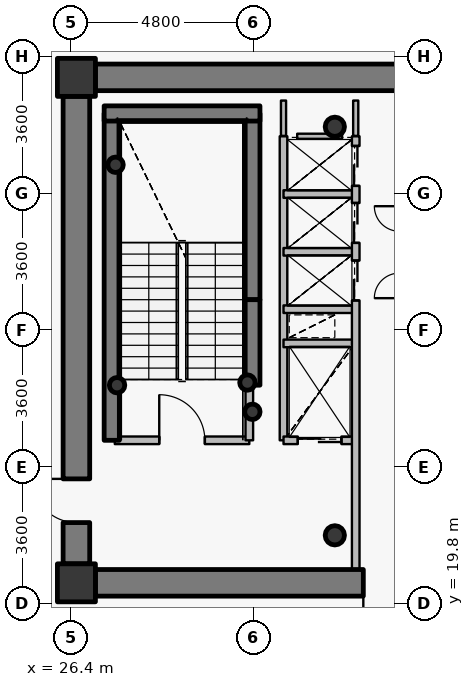
"""IFC4 building model, lengths in metres.
Left out: names, types, materials, properties, quantities, classifications, styles, units other than length and angle.
Written with IfcOpenShell. Run it as: python <this file> out.ifc"""

import sys

from ifc_helpers import new_model, si_unit, direction, frame, frame_2d, origin, origin_2d, place, context, subcontext, project, spatial, rectangle, hollow_circle, extrude, source, transform, mapped, element, fill, save


model = new_model("IFC4")
c1 = context("Model", 3, precision=1e-05, world=origin(), true_north=direction((0.0, 1.0)))
c2 = subcontext(c1, "Body", "Model", "MODEL_VIEW")
j1 = project(units=[si_unit("LENGTHUNIT", "METRE"), si_unit("PLANEANGLEUNIT", "RADIAN")], contexts=[c1])
p1 = place(None, origin())
s1 = spatial("IfcSite", under=j1, at=p1, CompositionType="ELEMENT")
p2 = place(p1, origin())
s2 = spatial("IfcBuilding", under=s1, at=p2, CompositionType="ELEMENT")
p3 = place(p2, frame((0.0, 0.0, 247.8)))
s3 = spatial("IfcBuildingStorey", under=s2, at=p3, CompositionType="ELEMENT", Elevation=247.8)
for number, where, z_axis, x_axis in (
    (1, (26.55, 20.35, 0.0), (0.0, 0.0, 1.0), (1.0, 0.0, 0.0)),
    (2, (26.55, 33.65, 0.0), (0.0, 0.0, 1.0), (1.0, 0.0, 0.0)),
):
    element("IfcColumn", number, at=place(p3, frame(where, z_axis=z_axis, x_axis=x_axis)), inside=s3, PredefinedType="COLUMN", context=c2, shape_type="SweptSolid", body=[
        extrude(rectangle(XDim=1.0, YDim=1.0, at=origin_2d()), origin(), (0.0, 0.0, 1.0), 3.75),
    ])
for number, where, z_axis, x_axis in (
    (3, (33.35, 21.6, 0.0), (0.0, 0.0, 1.0), (1.0, 0.0, 0.0)),
    (4, (33.35, 32.35, 0.0), (0.0, 0.0, 1.0), (1.0, 0.0, 0.0)),
):
    element("IfcColumn", number, at=place(p3, frame(where, z_axis=z_axis, x_axis=x_axis)), inside=s3, PredefinedType="COLUMN", context=c2, shape_type="SweptSolid", body=[
        extrude(hollow_circle(Radius=0.254, WallThickness=0.02, at=origin_2d()), origin(), (0.0, 0.0, 1.0), 3.75),
    ])
p4 = place(p3, frame((27.48, 24.1, 0.0), z_axis=(0.0, 0.0, 1.0), x_axis=(0.0, 1.0, 0.0)))
e5 = element("IfcWall", 5, at=p4, inside=s3, PredefinedType="SHEAR", context=c2, shape_type="SweptSolid", body=[
    extrude(rectangle(XDim=8.6, YDim=0.4, at=frame_2d((4.3, 0.0))), origin(), (0.0, 0.0, 1.0), 3.75),
])
p5 = place(p3, frame((31.18, 27.8, 0.0), z_axis=(0.0, 0.0, 1.0), x_axis=(0.0, 1.0, 0.0)))
e6 = element("IfcWall", 6, at=p5, inside=s3, PredefinedType="SHEAR", context=c2, shape_type="SweptSolid", body=[
    extrude(rectangle(XDim=4.9, YDim=0.4, at=frame_2d((2.45, 0.0))), origin(), (0.0, 0.0, 1.0), 3.75),
])
p6 = place(p3, frame((27.28, 32.7, 0.0), z_axis=(0.0, 0.0, 1.0), x_axis=(1.0, 0.0, 0.0)))
e7 = element("IfcWall", 7, at=p6, inside=s3, PredefinedType="SHEAR", context=c2, shape_type="SweptSolid", body=[
    extrude(rectangle(XDim=4.1, YDim=0.4, at=frame_2d((2.05, 0.0))), origin(), (0.0, 0.0, 1.0), 3.75),
])
for number, where, z_axis, x_axis in (
    (8, (27.58, 31.35, 0.0), (0.0, 0.0, 1.0), (1.0, 0.0, 0.0)),
    (9, (31.05, 25.62, 0.0), (0.0, 0.0, 1.0), (1.0, 0.0, 0.0)),
    (10, (31.18, 24.85, 0.0), (0.0, 0.0, 1.0), (1.0, 0.0, 0.0)),
    (11, (27.62, 25.55, 0.0), (0.0, 0.0, 1.0), (1.0, 0.0, 0.0)),
):
    element("IfcColumn", number, at=place(p3, frame(where, z_axis=z_axis, x_axis=x_axis)), inside=s3, PredefinedType="COLUMN", context=c2, shape_type="SweptSolid", body=[
        extrude(hollow_circle(Radius=0.203, WallThickness=0.016, at=origin_2d()), origin(), (0.0, 0.0, 1.0), 3.75),
    ])
p7 = place(p3, frame((27.05, 33.65, 0.0), z_axis=(0.0, 0.0, 1.0), x_axis=(1.0, 0.0, 0.0)))
e12 = element("IfcWall", 12, at=p7, inside=s3, PredefinedType="SHEAR", context=c2, shape_type="SweptSolid", body=[
    extrude(rectangle(XDim=17.9, YDim=0.7, at=frame_2d((8.95, 0.0))), origin(), (0.0, 0.0, 1.0), 3.05),
])
p8 = place(p7, frame((13.675, 0.0, 0.0)))
e13 = element("IfcOpeningElement", 13, at=p8, cuts=e12, PredefinedType="OPENING", context=c2, shape_type="SweptSolid", body=[
    extrude(rectangle(XDim=1.15, YDim=2.15, at=origin_2d()), frame((0.575, 0.36, 1.075), z_axis=(0.0, -1.0, 0.0), x_axis=(1.0, 0.0, 0.0)), (0.0, 0.0, 1.0), 0.72),
])
p9 = place(p3, frame((44.95, 20.35, 0.0), z_axis=(0.0, 0.0, 1.0), x_axis=(-1.0, 0.0, 0.0)))
e14 = element("IfcWall", 14, at=p9, inside=s3, PredefinedType="SHEAR", context=c2, shape_type="SweptSolid", body=[
    extrude(rectangle(XDim=17.9, YDim=0.7, at=frame_2d((8.95, 0.0))), origin(), (0.0, 0.0, 1.0), 3.05),
])
p10 = place(p9, frame((9.7, 0.0, 0.0)))
e15 = element("IfcOpeningElement", 15, at=p10, cuts=e14, PredefinedType="OPENING", context=c2, shape_type="SweptSolid", body=[
    extrude(rectangle(XDim=1.15, YDim=2.15, at=origin_2d()), frame((0.575, 0.36, 1.075), z_axis=(0.0, -1.0, 0.0), x_axis=(1.0, 0.0, 0.0)), (0.0, 0.0, 1.0), 0.72),
])
p11 = place(p3, frame((26.55, 20.85, 0.0), z_axis=(0.0, 0.0, 1.0), x_axis=(0.0, 1.0, 0.0)))
e16 = element("IfcWall", 16, at=p11, inside=s3, PredefinedType="SHEAR", context=c2, shape_type="SweptSolid", body=[
    extrude(rectangle(XDim=12.3, YDim=0.7, at=frame_2d((6.15, 0.0))), origin(), (0.0, 0.0, 1.0), 3.05),
])
p12 = place(p11, frame((1.085, 0.0, 0.0)))
e17 = element("IfcOpeningElement", 17, at=p12, cuts=e16, PredefinedType="OPENING", context=c2, shape_type="SweptSolid", body=[
    extrude(rectangle(XDim=1.15, YDim=2.15, at=origin_2d()), frame((0.575, 0.36, 1.075), z_axis=(0.0, -1.0, 0.0), x_axis=(1.0, 0.0, 0.0)), (0.0, 0.0, 1.0), 0.72),
])
p13 = place(p3, frame((31.18, 25.55, 0.0), z_axis=(0.0, 0.0, 1.0), x_axis=(0.0, 1.0, 0.0)))
e18 = element("IfcWall", 18, at=p13, inside=s3, PredefinedType="SHEAR", context=c2, shape_type="SweptSolid", body=[
    extrude(rectangle(XDim=2.25, YDim=0.4, at=frame_2d((1.125, 0.0))), origin(), (0.0, 0.0, 1.0), 3.1),
])
p14 = place(p3, frame((27.56, 24.1, 0.0), z_axis=(0.0, 0.0, 1.0), x_axis=(1.0, 0.0, 0.0)))
e19 = element("IfcWall", 19, at=p14, inside=s3, PredefinedType="PARTITIONING", context=c2, shape_type="SweptSolid", body=[
    extrude(rectangle(XDim=3.54, YDim=0.2, at=frame_2d((1.77, 0.0))), origin(), (0.0, 0.0, 1.0), 3.5),
])
p15 = place(p14, frame((1.17, 0.0, 0.0)))
e20 = element("IfcOpeningElement", 20, at=p15, cuts=e19, PredefinedType="OPENING", context=c2, shape_type="SweptSolid", body=[
    extrude(rectangle(XDim=1.2, YDim=2.15, at=origin_2d()), frame((0.6, 0.11, 1.075), z_axis=(0.0, -1.0, 0.0), x_axis=(1.0, 0.0, 0.0)), (0.0, 0.0, 1.0), 0.22),
])
p16 = place(p3, frame((31.1, 24.1, 0.0), z_axis=(0.0, 0.0, 1.0), x_axis=(0.0, 1.0, 0.0)))
e21 = element("IfcWall", 21, at=p16, inside=s3, PredefinedType="PARTITIONING", context=c2, shape_type="SweptSolid", body=[
    extrude(rectangle(XDim=1.44, YDim=0.2, at=frame_2d((0.72, 0.0))), origin(), (0.0, 0.0, 1.0), 3.5),
])
p17 = place(p3, frame((32.0, 24.1, 0.0), z_axis=(0.0, 0.0, 1.0), x_axis=(0.0, 1.0, 0.0)))
e22 = element("IfcWall", 22, at=p17, inside=s3, PredefinedType="PARTITIONING", context=c2, shape_type="SweptSolid", body=[
    extrude(rectangle(XDim=8.0, YDim=0.2, at=frame_2d((4.0, 0.0))), origin(), (0.0, 0.0, 1.0), 3.5),
])
p18 = place(p3, frame((32.0, 24.1, 0.0), z_axis=(0.0, 0.0, 1.0), x_axis=(1.0, 0.0, 0.0)))
e23 = element("IfcWall", 23, at=p18, inside=s3, PredefinedType="PARTITIONING", context=c2, shape_type="SweptSolid", body=[
    extrude(rectangle(XDim=1.9, YDim=0.2, at=frame_2d((0.95, 0.0))), origin(), (0.0, 0.0, 1.0), 3.085),
])
p19 = place(p18, frame((0.375, 0.0, 0.0)))
e24 = element("IfcOpeningElement", 24, at=p19, cuts=e23, PredefinedType="OPENING", context=c2, shape_type="SweptSolid", body=[
    extrude(rectangle(XDim=1.15, YDim=2.15, at=origin_2d()), frame((0.575, 0.11, 1.075), z_axis=(0.0, -1.0, 0.0), x_axis=(1.0, 0.0, 0.0)), (0.0, 0.0, 1.0), 0.22),
])
for number, where, z_axis, x_axis in (
    (25, (32.0, 26.65, 0.0), (0.0, 0.0, 1.0), (1.0, 0.0, 0.0)),
    (26, (32.0, 27.55, 0.0), (0.0, 0.0, 1.0), (1.0, 0.0, 0.0)),
    (27, (32.0, 29.06, 0.0), (0.0, 0.0, 1.0), (1.0, 0.0, 0.0)),
    (28, (32.0, 30.58, 0.0), (0.0, 0.0, 1.0), (1.0, 0.0, 0.0)),
):
    element("IfcWall", number, at=place(p3, frame(where, z_axis=z_axis, x_axis=x_axis)), inside=s3, PredefinedType="PARTITIONING", context=c2, shape_type="SweptSolid", body=[
        extrude(rectangle(XDim=1.9, YDim=0.2, at=frame_2d((0.95, 0.0))), origin(), (0.0, 0.0, 1.0), 3.085),
    ])
p20 = place(p3, frame((33.9, 20.7, 0.0), z_axis=(0.0, 0.0, 1.0), x_axis=(0.0, 1.0, 0.0)))
e29 = element("IfcWall", 29, at=p20, inside=s3, PredefinedType="PARTITIONING", context=c2, shape_type="SweptSolid", body=[
    extrude(rectangle(XDim=11.4, YDim=0.2, at=frame_2d((5.7, 0.0))), origin(), (0.0, 0.0, 1.0), 3.085),
])
p21 = place(p20, frame((7.08, 0.0, 0.0)))
e30 = element("IfcOpeningElement", 30, at=p21, cuts=e29, PredefinedType="OPENING", context=c2, shape_type="SweptSolid", body=[
    extrude(rectangle(XDim=1.05, YDim=2.15, at=origin_2d()), frame((0.525, 0.11, 1.075), z_axis=(0.0, -1.0, 0.0), x_axis=(1.0, 0.0, 0.0)), (0.0, 0.0, 1.0), 0.22),
])
p22 = place(p20, frame((8.595, 0.0, 0.0)))
e31 = element("IfcOpeningElement", 31, at=p22, cuts=e29, PredefinedType="OPENING", context=c2, shape_type="SweptSolid", body=[
    extrude(rectangle(XDim=1.05, YDim=2.15, at=origin_2d()), frame((0.525, 0.11, 1.075), z_axis=(0.0, -1.0, 0.0), x_axis=(1.0, 0.0, 0.0)), (0.0, 0.0, 1.0), 0.22),
])
p23 = place(p20, frame((10.095, 0.0, 0.0)))
e32 = element("IfcOpeningElement", 32, at=p23, cuts=e29, PredefinedType="OPENING", context=c2, shape_type="SweptSolid", body=[
    extrude(rectangle(XDim=1.05, YDim=2.15, at=origin_2d()), frame((0.525, 0.11, 1.075), z_axis=(0.0, -1.0, 0.0), x_axis=(1.0, 0.0, 0.0)), (0.0, 0.0, 1.0), 0.22),
])
p24 = place(p3, frame((32.36, 32.1, 0.0), z_axis=(0.0, 0.0, 1.0), x_axis=(1.0, 0.0, 0.0)))
e33 = element("IfcWall", 33, at=p24, inside=s3, PredefinedType="PARTITIONING", context=c2, shape_type="SweptSolid", body=[
    extrude(rectangle(XDim=1.18, YDim=0.135, at=frame_2d((0.59, 0.0))), origin(), (0.0, 0.0, 1.0), 3.085),
])
p25 = place(p3, frame((32.0, 33.04, 0.0), z_axis=(0.0, 0.0, 1.0), x_axis=(0.0, -1.0, 0.0)))
e34 = element("IfcWall", 34, at=p25, inside=s3, PredefinedType="PARTITIONING", context=c2, shape_type="SweptSolid", body=[
    extrude(rectangle(XDim=0.93, YDim=0.135, at=frame_2d((0.465, 0.0))), origin(), (0.0, 0.0, 1.0), 3.035),
])
p26 = place(p3, frame((33.9, 32.11, 0.0), z_axis=(0.0, 0.0, 1.0), x_axis=(0.0, 1.0, 0.0)))
e35 = element("IfcWall", 35, at=p26, inside=s3, PredefinedType="PARTITIONING", context=c2, shape_type="SweptSolid", body=[
    extrude(rectangle(XDim=0.93, YDim=0.135, at=frame_2d((0.465, 0.0))), origin(), (0.0, 0.0, 1.0), 3.085),
])
p27 = place(p3, frame((27.04, 34.0, 0.0), z_axis=(0.0, 0.0, 1.0), x_axis=(-1.0, 0.0, 0.0)))
e36 = element("IfcWall", 36, at=p27, inside=s3, PredefinedType="PARTITIONING", context=c2, shape_type="SweptSolid", body=[
    extrude(rectangle(XDim=0.84, YDim=0.135, at=frame_2d((0.42, 0.0))), origin(), (0.0, 0.0, 1.0), 2.935),
])
p28 = place(p3, frame((26.2, 33.692, 0.0), z_axis=(0.0, 0.0, 1.0), x_axis=(0.0, -1.0, 0.0)))
e37 = element("IfcWall", 37, at=p28, inside=s3, PredefinedType="PARTITIONING", context=c2, shape_type="SweptSolid", body=[
    extrude(rectangle(XDim=0.532, YDim=0.135, at=frame_2d((0.266, 0.0))), origin(), (0.0, 0.0, 1.0), 3.5),
])
p29 = place(p3, frame((26.2, 20.84, 0.0), z_axis=(0.0, 0.0, 1.0), x_axis=(0.0, -1.0, 0.0)))
e38 = element("IfcWall", 38, at=p29, inside=s3, PredefinedType="PARTITIONING", context=c2, shape_type="SweptSolid", body=[
    extrude(rectangle(XDim=0.84, YDim=0.135, at=frame_2d((0.42, 0.0))), origin(), (0.0, 0.0, 1.0), 3.5),
])
p30 = place(p3, frame((26.508, 20.0, 0.0), z_axis=(0.0, 0.0, 1.0), x_axis=(1.0, 0.0, 0.0)))
e39 = element("IfcWall", 39, at=p30, inside=s3, PredefinedType="PARTITIONING", context=c2, shape_type="SweptSolid", body=[
    extrude(rectangle(XDim=0.532, YDim=0.135, at=frame_2d((0.266, 0.0))), origin(), (0.0, 0.0, 1.0), 2.935),
])
m1 = source(origin(), c2, "Body", "SweptSolid", [
    extrude(rectangle(XDim=1.15, YDim=2.15, at=origin_2d()), frame((0.575, 0.025, 1.075), z_axis=(0.0, -1.0, 0.0), x_axis=(1.0, 0.0, 0.0)), (0.0, 0.0, 1.0), 0.05),
])
p31 = place(p12, origin())
e40 = element("IfcDoor", 40, at=p31, inside=s3, OperationType="SINGLE_SWING_RIGHT", PredefinedType="DOOR", context=c2, shape_type="MappedRepresentation", body=[
    mapped(m1, transform((0.0, 0.0, 0.0), x_axis=(1.0, 0.0, 0.0), y_axis=(0.0, 1.0, 0.0), z_axis=(0.0, 0.0, 1.0), scale=1.0)),
])
fill(e17, e40)
p32 = place(p10, origin())
e41 = element("IfcDoor", 41, at=p32, inside=s3, OperationType="SINGLE_SWING_RIGHT", PredefinedType="DOOR", context=c2, shape_type="MappedRepresentation", body=[
    mapped(m1, transform((0.0, 0.0, 0.0), x_axis=(1.0, 0.0, 0.0), y_axis=(0.0, 1.0, 0.0), z_axis=(0.0, 0.0, 1.0), scale=1.0)),
])
fill(e15, e41)
m2 = source(origin(), c2, "Body", "SweptSolid", [
    extrude(rectangle(XDim=1.2, YDim=2.15, at=origin_2d()), frame((0.6, 0.025, 1.075), z_axis=(0.0, -1.0, 0.0), x_axis=(1.0, 0.0, 0.0)), (0.0, 0.0, 1.0), 0.05),
])
p33 = place(p15, origin())
e42 = element("IfcDoor", 42, at=p33, inside=s3, OperationType="SINGLE_SWING_LEFT", PredefinedType="DOOR", context=c2, shape_type="MappedRepresentation", body=[
    mapped(m2, transform((0.0, 0.0, 0.0), x_axis=(1.0, 0.0, 0.0), y_axis=(0.0, 1.0, 0.0), z_axis=(0.0, 0.0, 1.0), scale=1.0)),
])
fill(e20, e42)
m3 = source(origin(), c2, "Body", "SweptSolid", [
    extrude(rectangle(XDim=1.15, YDim=2.15, at=origin_2d()), frame((0.575, 0.025, 1.075), z_axis=(0.0, -1.0, 0.0), x_axis=(1.0, 0.0, 0.0)), (0.0, 0.0, 1.0), 0.05),
])
p34 = place(p19, origin())
e43 = element("IfcDoor", 43, at=p34, inside=s3, OperationType="DOUBLE_DOOR_SLIDING", PredefinedType="USERDEFINED", context=c2, shape_type="MappedRepresentation", body=[
    mapped(m3, transform((0.0, 0.0, 0.0), x_axis=(1.0, 0.0, 0.0), y_axis=(0.0, 1.0, 0.0), z_axis=(0.0, 0.0, 1.0), scale=1.0)),
])
fill(e24, e43)
m4 = source(origin(), c2, "Body", "SweptSolid", [
    extrude(rectangle(XDim=1.05, YDim=2.15, at=origin_2d()), frame((0.525, 0.025, 1.075), z_axis=(0.0, -1.0, 0.0), x_axis=(1.0, 0.0, 0.0)), (0.0, 0.0, 1.0), 0.05),
])
p35 = place(p21, origin())
e44 = element("IfcDoor", 44, at=p35, inside=s3, OperationType="DOUBLE_DOOR_SLIDING", PredefinedType="USERDEFINED", context=c2, shape_type="MappedRepresentation", body=[
    mapped(m4, transform((0.0, 0.0, 0.0), x_axis=(1.0, 0.0, 0.0), y_axis=(0.0, 1.0, 0.0), z_axis=(0.0, 0.0, 1.0), scale=1.0)),
])
fill(e30, e44)
p36 = place(p22, origin())
e45 = element("IfcDoor", 45, at=p36, inside=s3, OperationType="DOUBLE_DOOR_SLIDING", PredefinedType="USERDEFINED", context=c2, shape_type="MappedRepresentation", body=[
    mapped(m4, transform((0.0, 0.0, 0.0), x_axis=(1.0, 0.0, 0.0), y_axis=(0.0, 1.0, 0.0), z_axis=(0.0, 0.0, 1.0), scale=1.0)),
])
fill(e31, e45)
p37 = place(p23, origin())
e46 = element("IfcDoor", 46, at=p37, inside=s3, OperationType="DOUBLE_DOOR_SLIDING", PredefinedType="USERDEFINED", context=c2, shape_type="MappedRepresentation", body=[
    mapped(m4, transform((0.0, 0.0, 0.0), x_axis=(1.0, 0.0, 0.0), y_axis=(0.0, 1.0, 0.0), z_axis=(0.0, 0.0, 1.0), scale=1.0)),
])
fill(e32, e46)
save(model, sys.argv[1])
